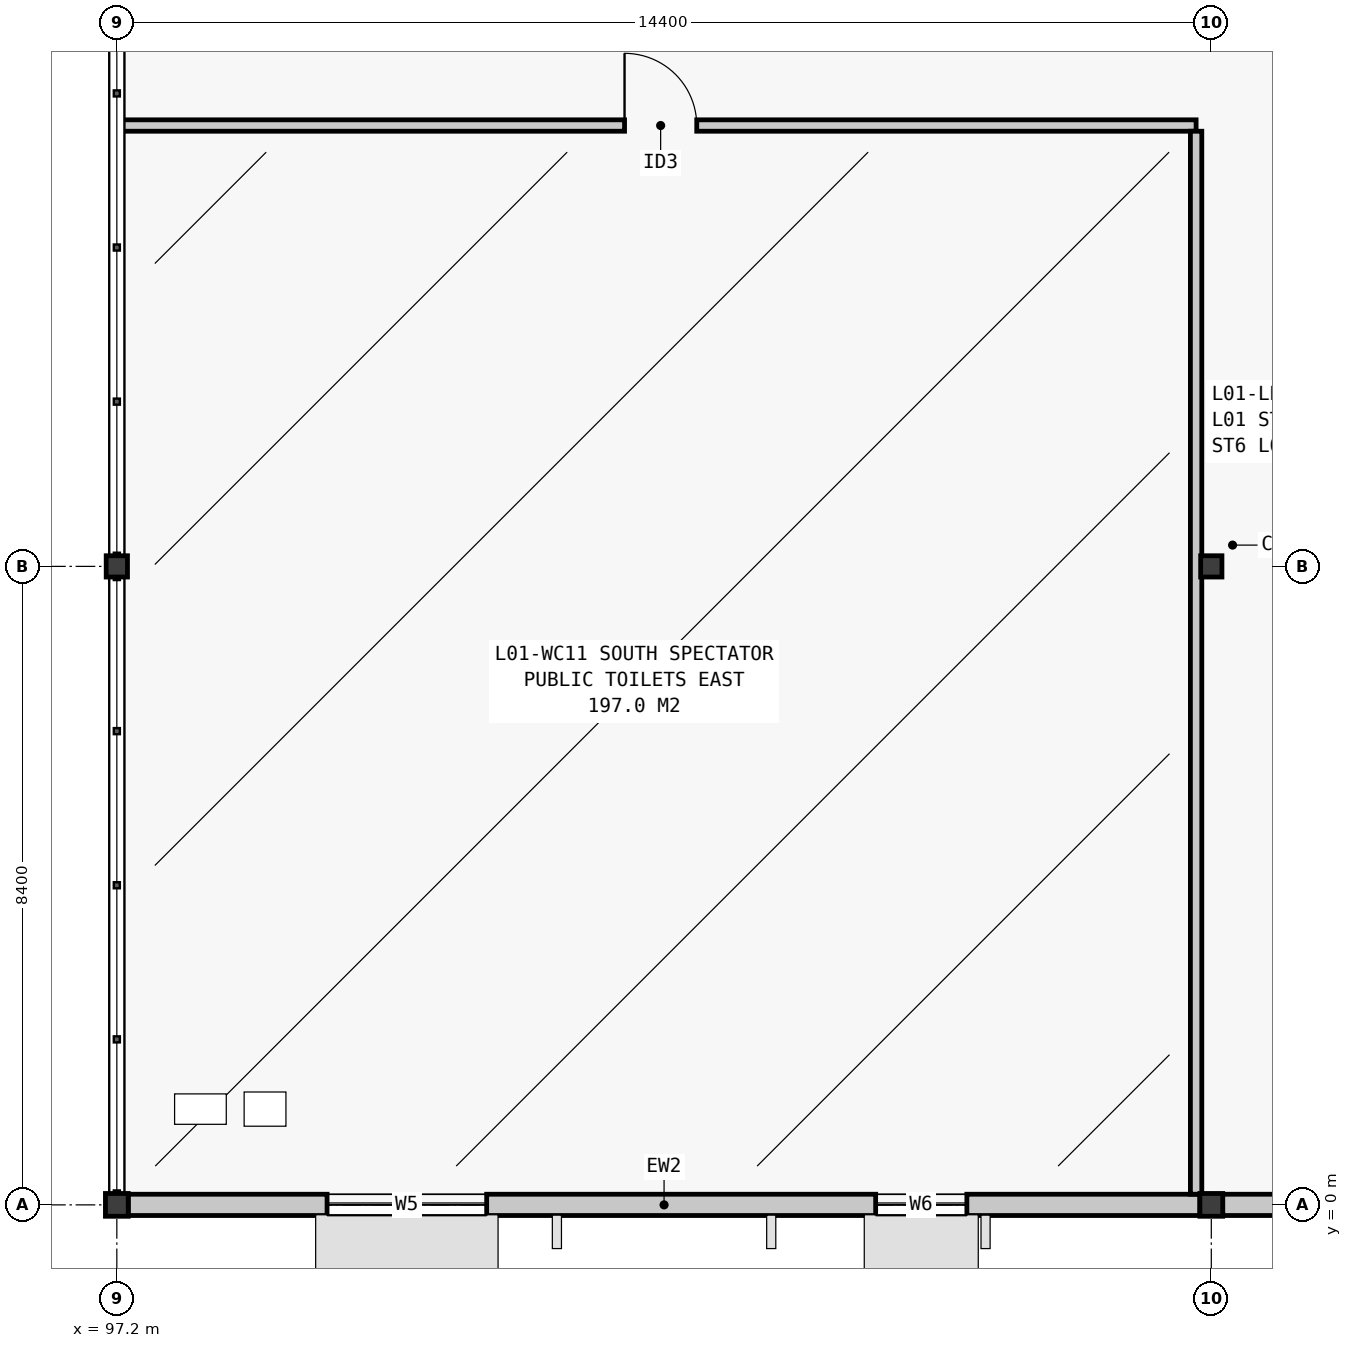
"""IFC4 building model, lengths in metres.
Left out: names, types, materials, properties, quantities, classifications, styles, units other than length and angle.
Written with IfcOpenShell. Run it as: python <this file> out.ifc"""

import sys

from ifc_helpers import new_model, si_unit, direction, frame, frame_2d, origin, origin_2d, place, context, subcontext, project, spatial, rectangle, i_section, extrude, element, fill, save


model = new_model("IFC4")
c1 = context("Model", 3, precision=1e-05, world=origin(), true_north=direction((0.0, 1.0)))
c2 = subcontext(c1, "Body", "Model", "MODEL_VIEW")
j1 = project(units=[si_unit("LENGTHUNIT", "METRE"), si_unit("PLANEANGLEUNIT", "RADIAN")], contexts=[c1])
p1 = place(None, origin())
s1 = spatial("IfcSite", under=j1, at=p1, CompositionType="ELEMENT")
p2 = place(p1, origin())
s2 = spatial("IfcBuilding", under=s1, at=p2, CompositionType="ELEMENT")
p3 = place(p2, frame((0.0, 0.0, 4.8)))
s3 = spatial("IfcBuildingStorey", under=s2, at=p3, CompositionType="ELEMENT", Elevation=4.8)
p4 = place(p3, frame((97.2, 0.0, 0.0), z_axis=(0.0, 0.0, 1.0), x_axis=(1.0, 0.0, 0.0)))
e1 = element("IfcColumn", 1, at=p4, inside=s3, PredefinedType="COLUMN", context=c2, shape_type="SweptSolid", body=[
    extrude(i_section(OverallWidth=0.3, OverallDepth=0.3, WebThickness=0.011, FlangeThickness=0.019, FilletRadius=0.027, at=origin_2d()), origin(), (0.0, 0.0, 1.0), 4.2),
])
p5 = place(p3, frame((97.2, 8.4, 0.0), z_axis=(0.0, 0.0, 1.0), x_axis=(1.0, 0.0, 0.0)))
e2 = element("IfcColumn", 2, at=p5, inside=s3, PredefinedType="COLUMN", context=c2, shape_type="SweptSolid", body=[
    extrude(i_section(OverallWidth=0.28, OverallDepth=0.28, WebThickness=0.01, FlangeThickness=0.018, FilletRadius=0.024, at=origin_2d()), origin(), (0.0, 0.0, 1.0), 4.2),
])
p6 = place(p3, frame((111.6, 0.0, 0.0), z_axis=(0.0, 0.0, 1.0), x_axis=(1.0, 0.0, 0.0)))
e3 = element("IfcColumn", 3, at=p6, inside=s3, PredefinedType="COLUMN", context=c2, shape_type="SweptSolid", body=[
    extrude(i_section(OverallWidth=0.3, OverallDepth=0.3, WebThickness=0.011, FlangeThickness=0.019, FilletRadius=0.027, at=origin_2d()), origin(), (0.0, 0.0, 1.0), 4.2),
])
p7 = place(p3, frame((111.6, 8.4, 0.0), z_axis=(0.0, 0.0, 1.0), x_axis=(1.0, 0.0, 0.0)))
e4 = element("IfcColumn", 4, at=p7, inside=s3, PredefinedType="COLUMN", context=c2, shape_type="SweptSolid", body=[
    extrude(i_section(OverallWidth=0.28, OverallDepth=0.28, WebThickness=0.01, FlangeThickness=0.018, FilletRadius=0.024, at=origin_2d()), origin(), (0.0, 0.0, 1.0), 4.2),
])
p8 = place(p3, frame((97.35, 0.0, 0.0), z_axis=(0.0, 0.0, 1.0), x_axis=(1.0, 0.0, 0.0)))
e5 = element("IfcWall", 5, at=p8, inside=s3, PredefinedType="STANDARD", context=c2, shape_type="SweptSolid", body=[
    extrude(rectangle(XDim=14.1, YDim=0.28, at=frame_2d((7.05, 0.0))), origin(), (0.0, 0.0, 1.0), 3.292),
])
p9 = place(p8, frame((2.616, 0.0, 1.0)))
e6 = element("IfcOpeningElement", 6, at=p9, cuts=e5, PredefinedType="OPENING", context=c2, shape_type="SweptSolid", body=[
    extrude(rectangle(XDim=2.1, YDim=1.6, at=frame_2d((1.05, 0.8))), frame((0.0, 0.155, 0.0), z_axis=(0.0, -1.0, 0.0), x_axis=(1.0, 0.0, 0.0)), (0.0, 0.0, 1.0), 0.31),
])
p10 = place(p8, frame((9.834, 0.0, 1.1)))
e7 = element("IfcOpeningElement", 7, at=p10, cuts=e5, PredefinedType="OPENING", context=c2, shape_type="SweptSolid", body=[
    extrude(rectangle(XDim=1.2, YDim=1.5, at=frame_2d((0.6, 0.75))), frame((0.0, 0.155, 0.0), z_axis=(0.0, -1.0, 0.0), x_axis=(1.0, 0.0, 0.0)), (0.0, 0.0, 1.0), 0.31),
])
p11 = place(p3, frame((111.75, 0.0, 0.0), z_axis=(0.0, 0.0, 1.0), x_axis=(1.0, 0.0, 0.0)))
e8 = element("IfcWall", 8, at=p11, inside=s3, PredefinedType="STANDARD", context=c2, shape_type="SweptSolid", body=[
    extrude(rectangle(XDim=14.1, YDim=0.28, at=frame_2d((7.05, 0.0))), origin(), (0.0, 0.0, 1.0), 3.292),
])
p12 = place(p11, frame((2.316, 0.0, 1.05)))
e9 = element("IfcOpeningElement", 9, at=p12, cuts=e8, PredefinedType="OPENING", context=c2, shape_type="SweptSolid", body=[
    extrude(rectangle(XDim=2.7, YDim=1.5, at=frame_2d((1.35, 0.75))), frame((0.0, 0.155, 0.0), z_axis=(0.0, -1.0, 0.0), x_axis=(1.0, 0.0, 0.0)), (0.0, 0.0, 1.0), 0.31),
])
p13 = place(p11, frame((9.534, 0.0, 1.35)))
e10 = element("IfcOpeningElement", 10, at=p13, cuts=e8, PredefinedType="OPENING", context=c2, shape_type="SweptSolid", body=[
    extrude(rectangle(XDim=1.8, YDim=1.2, at=frame_2d((0.9, 0.6))), frame((0.0, 0.155, 0.0), z_axis=(0.0, -1.0, 0.0), x_axis=(1.0, 0.0, 0.0)), (0.0, 0.0, 1.0), 0.31),
])
p14 = place(p3, frame((97.22, 14.2, 0.0), z_axis=(0.0, 0.0, 1.0), x_axis=(1.0, 0.0, 0.0)))
e11 = element("IfcWall", 11, at=p14, inside=s3, PredefinedType="PLUMBINGWALL", context=c2, shape_type="SweptSolid", body=[
    extrude(rectangle(XDim=14.18, YDim=0.15, at=frame_2d((7.09, 0.0))), origin(), (0.0, 0.0, 1.0), 3.94),
])
p15 = place(p14, frame((6.66, 0.0, 0.0)))
e12 = element("IfcOpeningElement", 12, at=p15, cuts=e11, PredefinedType="OPENING", context=c2, shape_type="SweptSolid", body=[
    extrude(rectangle(XDim=0.95, YDim=2.1, at=frame_2d((0.475, 1.05))), frame((0.0, 0.09, 0.0), z_axis=(0.0, -1.0, 0.0), x_axis=(1.0, 0.0, 0.0)), (0.0, 0.0, 1.0), 0.18),
])
p16 = place(p3, frame((111.4, 0.14, 0.0), z_axis=(0.0, 0.0, 1.0), x_axis=(0.0, 1.0, 0.0)))
e13 = element("IfcWall", 13, at=p16, inside=s3, PredefinedType="PLUMBINGWALL", context=c2, shape_type="SweptSolid", body=[
    extrude(rectangle(XDim=13.985, YDim=0.15, at=frame_2d((6.993, 0.0))), origin(), (0.0, 0.0, 1.0), 3.94),
])
p17 = place(p9, origin())
e14 = element("IfcWindow", 14, at=p17, inside=s3, PartitioningType="SINGLE_PANEL", PredefinedType="WINDOW", context=c2, shape_type="SweptSolid", body=[
    extrude(rectangle(XDim=2.1, YDim=1.6, at=frame_2d((1.05, 0.8))), frame((0.0, 0.03, 0.0), z_axis=(0.0, -1.0, 0.0), x_axis=(1.0, 0.0, 0.0)), (0.0, 0.0, 1.0), 0.06),
])
fill(e6, e14)
p18 = place(p10, origin())
e15 = element("IfcWindow", 15, at=p18, inside=s3, PartitioningType="SINGLE_PANEL", PredefinedType="WINDOW", context=c2, shape_type="SweptSolid", body=[
    extrude(rectangle(XDim=1.2, YDim=1.5, at=frame_2d((0.6, 0.75))), frame((0.0, 0.03, 0.0), z_axis=(0.0, -1.0, 0.0), x_axis=(1.0, 0.0, 0.0)), (0.0, 0.0, 1.0), 0.06),
])
fill(e7, e15)
p19 = place(p15, origin())
e16 = element("IfcDoor", 16, at=p19, inside=s3, OperationType="SINGLE_SWING_LEFT", PredefinedType="DOOR", context=c2, shape_type="SweptSolid", body=[
    extrude(rectangle(XDim=0.95, YDim=2.1, at=frame_2d((0.475, 1.05))), frame((0.0, 0.025, 0.0), z_axis=(0.0, -1.0, 0.0), x_axis=(1.0, 0.0, 0.0)), (0.0, 0.0, 1.0), 0.05),
])
fill(e12, e16)
save(model, sys.argv[1])
